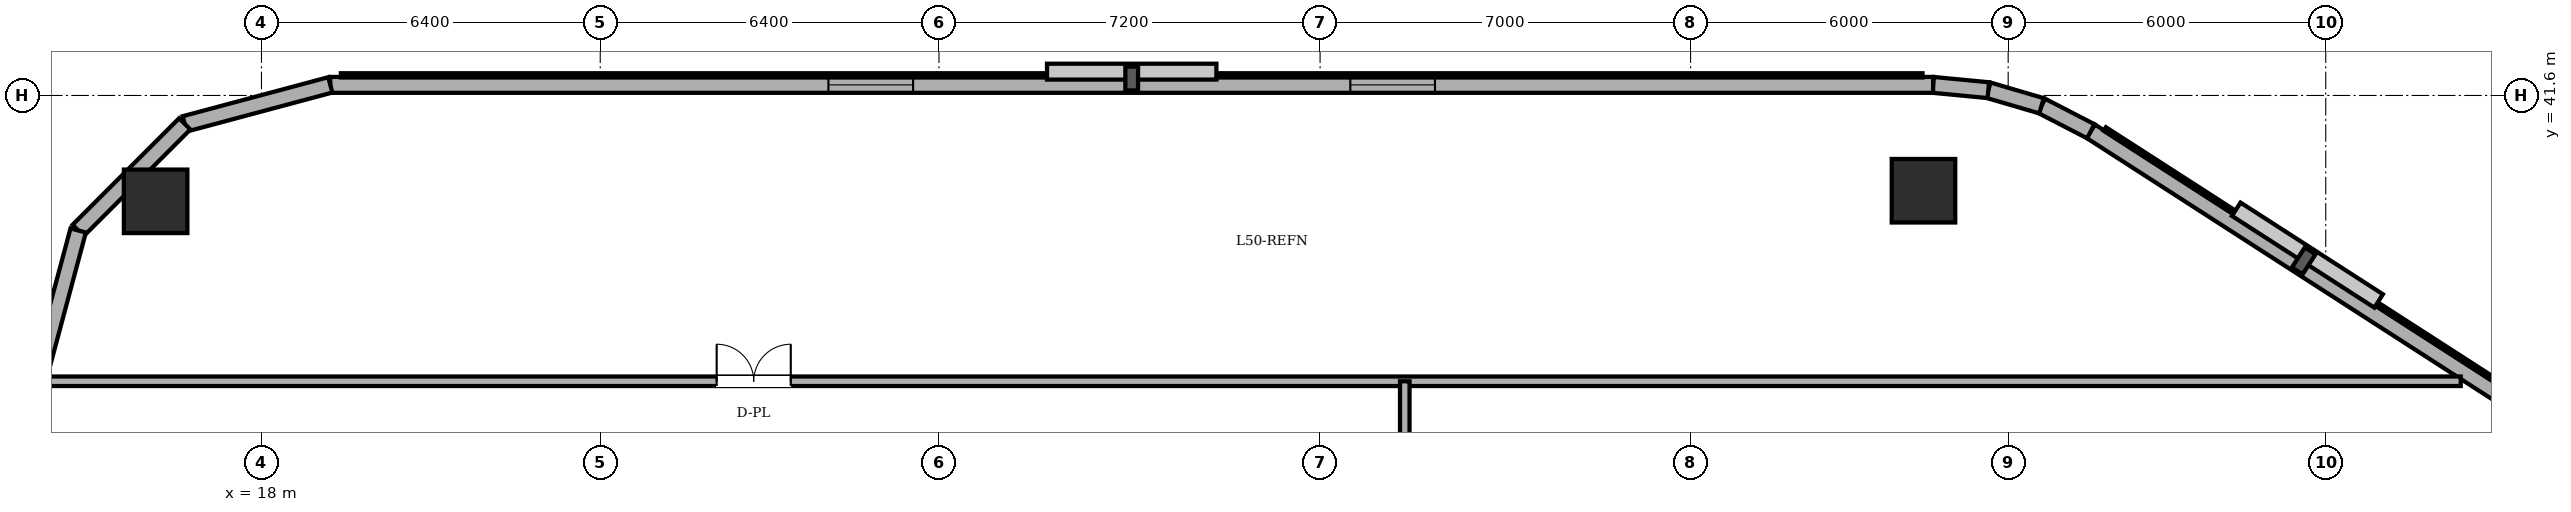
"""IFC4 building model, lengths in metres.
Left out: names, types, materials, properties, quantities, classifications, styles, units other than length and angle.
Written with IfcOpenShell. Run it as: python <this file> out.ifc"""

import sys

from ifc_helpers import new_model, si_unit, direction, frame, frame_2d, origin, origin_2d, place, context, subcontext, project, spatial, rectangle, circle, extrude, element, fill, save


model = new_model("IFC4")
c1 = context("Model", 3, precision=1e-05, world=origin(), true_north=direction((0.0, 1.0)))
c2 = subcontext(c1, "Body", "Model", "MODEL_VIEW")
j1 = project(units=[si_unit("LENGTHUNIT", "METRE"), si_unit("PLANEANGLEUNIT", "RADIAN")], contexts=[c1])
p1 = place(None, origin())
s1 = spatial("IfcSite", under=j1, at=p1, CompositionType="ELEMENT")
p2 = place(p1, origin())
s2 = spatial("IfcBuilding", under=s1, at=p2, CompositionType="ELEMENT")
p3 = place(p2, frame((0.0, 0.0, 190.6)))
s3 = spatial("IfcBuildingStorey", under=s2, at=p3, CompositionType="ELEMENT", Elevation=190.6)
for number, where, z_axis, x_axis in (
    (1, (49.4, 39.8, 0.0), (0.0, 0.0, 1.0), (1.0, 0.0, 0.0)),
    (2, (16.0, 39.6, 0.0), (0.0, 0.0, 1.0), (1.0, 0.0, 0.0)),
):
    element("IfcColumn", number, at=place(p3, frame(where, z_axis=z_axis, x_axis=x_axis)), inside=s3, PredefinedType="COLUMN", context=c2, shape_type="SweptSolid", body=[
        extrude(circle(Radius=0.6, at=origin_2d()), origin(), (0.0, 0.0, 1.0), 2.96),
    ])
p4 = place(p3, frame((60.478, 35.824, 0.0), z_axis=(0.0, 0.0, 1.0), x_axis=(-0.840696388796, 0.541506769917, 0.0)))
e3 = element("IfcWall", 3, at=p4, inside=s3, PredefinedType="SOLIDWALL", context=c2, shape_type="SweptSolid", body=[
    extrude(rectangle(XDim=9.418, YDim=0.3, at=frame_2d((4.709, 0.0))), origin(), (0.0, 0.0, 1.0), 5.36),
])
p5 = place(p3, frame((52.56, 40.924, 0.0), z_axis=(0.0, 0.0, 1.0), x_axis=(-0.888283247196, 0.459296062198, 0.0)))
e4 = element("IfcWall", 4, at=p5, inside=s3, PredefinedType="SOLIDWALL", context=c2, shape_type="SweptSolid", body=[
    extrude(rectangle(XDim=1.047, YDim=0.3, at=frame_2d((0.523, 0.0))), origin(), (0.0, 0.0, 1.0), 5.36),
])
p6 = place(p3, frame((51.63, 41.405, 0.0), z_axis=(0.0, 0.0, 1.0), x_axis=(-0.959528674476, 0.281610942363, 0.0)))
e5 = element("IfcWall", 5, at=p6, inside=s3, PredefinedType="SOLIDWALL", context=c2, shape_type="SweptSolid", body=[
    extrude(rectangle(XDim=1.047, YDim=0.3, at=frame_2d((0.524, 0.0))), origin(), (0.0, 0.0, 1.0), 5.36),
])
p7 = place(p3, frame((50.625, 41.7, 0.0), z_axis=(0.0, 0.0, 1.0), x_axis=(-0.995426089968, 0.095534807324, 0.0)))
e6 = element("IfcWall", 6, at=p7, inside=s3, PredefinedType="SOLIDWALL", context=c2, shape_type="SweptSolid", body=[
    extrude(rectangle(XDim=1.048, YDim=0.3, at=frame_2d((0.524, 0.0))), origin(), (0.0, 0.0, 1.0), 5.36),
])
p8 = place(p3, frame((49.582, 41.8, 0.0), z_axis=(0.0, 0.0, 1.0), x_axis=(-1.0, 0.0, 0.0)))
e7 = element("IfcWall", 7, at=p8, inside=s3, PredefinedType="SOLIDWALL", context=c2, shape_type="SweptSolid", body=[
    extrude(rectangle(XDim=30.282, YDim=0.3, at=frame_2d((15.141, 0.0))), origin(), (0.0, 0.0, 1.0), 5.36),
])
p9 = place(p8, frame((9.411, 0.0, 0.85)))
e8 = element("IfcOpeningElement", 8, at=p9, cuts=e7, PredefinedType="OPENING", context=c2, shape_type="SweptSolid", body=[
    extrude(rectangle(XDim=1.6, YDim=1.2, at=frame_2d((0.8, 0.6))), frame((0.0, 0.16, 0.0), z_axis=(0.0, -1.0, 0.0), x_axis=(1.0, 0.0, 0.0)), (0.0, 0.0, 1.0), 0.32),
])
p10 = place(p8, frame((19.271, 0.0, 0.85)))
e9 = element("IfcOpeningElement", 9, at=p10, cuts=e7, PredefinedType="OPENING", context=c2, shape_type="SweptSolid", body=[
    extrude(rectangle(XDim=1.6, YDim=1.2, at=frame_2d((0.8, 0.6))), frame((0.0, 0.16, 0.0), z_axis=(0.0, -1.0, 0.0), x_axis=(1.0, 0.0, 0.0)), (0.0, 0.0, 1.0), 0.32),
])
p11 = place(p3, frame((19.3, 41.8, 0.0), z_axis=(0.0, 0.0, 1.0), x_axis=(-0.965908238586, -0.258884674387, 0.0)))
e10 = element("IfcWall", 10, at=p11, inside=s3, PredefinedType="SOLIDWALL", context=c2, shape_type="SweptSolid", body=[
    extrude(rectangle(XDim=2.847, YDim=0.3, at=frame_2d((1.424, 0.0))), origin(), (0.0, 0.0, 1.0), 5.36),
])
p12 = place(p3, frame((16.55, 41.063, 0.0), z_axis=(0.0, 0.0, 1.0), x_axis=(-0.707106781187, -0.707106781187, 0.0)))
e11 = element("IfcWall", 11, at=p12, inside=s3, PredefinedType="SOLIDWALL", context=c2, shape_type="SweptSolid", body=[
    extrude(rectangle(XDim=2.847, YDim=0.3, at=frame_2d((1.423, 0.0))), origin(), (0.0, 0.0, 1.0), 5.36),
])
p13 = place(p3, frame((14.537, 39.05, 0.0), z_axis=(0.0, 0.0, 1.0), x_axis=(-0.258884674387, -0.965908238586, 0.0)))
e12 = element("IfcWall", 12, at=p13, inside=s3, PredefinedType="SOLIDWALL", context=c2, shape_type="SweptSolid", body=[
    extrude(rectangle(XDim=2.847, YDim=0.3, at=frame_2d((1.424, 0.0))), origin(), (0.0, 0.0, 1.0), 5.36),
])
p14 = place(p3, frame((13.8, 36.2, 0.0), z_axis=(0.0, 0.0, 1.0), x_axis=(1.0, 0.0, 0.0)))
e13 = element("IfcWall", 13, at=p14, inside=s3, PredefinedType="PARTITIONING", context=c2, shape_type="SweptSolid", body=[
    extrude(rectangle(XDim=45.75, YDim=0.18, at=frame_2d((22.875, 0.0))), origin(), (0.0, 0.0, 1.0), 5.36),
])
p15 = place(p14, frame((12.8, 0.0, 0.0)))
e14 = element("IfcOpeningElement", 14, at=p15, cuts=e13, PredefinedType="OPENING", context=c2, shape_type="SweptSolid", body=[
    extrude(rectangle(XDim=1.4, YDim=2.25, at=frame_2d((0.7, 1.125))), frame((0.0, 0.1, 0.0), z_axis=(0.0, -1.0, 0.0), x_axis=(1.0, 0.0, 0.0)), (0.0, 0.0, 1.0), 0.2),
])
p16 = place(p3, frame((39.6, 11.8, 0.0), z_axis=(0.0, 0.0, 1.0), x_axis=(0.0, 1.0, 0.0)))
e15 = element("IfcWall", 15, at=p16, inside=s3, PredefinedType="PARTITIONING", context=c2, shape_type="SweptSolid", body=[
    extrude(rectangle(XDim=24.4, YDim=0.18, at=frame_2d((12.2, 0.0))), origin(), (0.0, 0.0, 1.0), 5.36),
])
p17 = place(p16, frame((18.07, 0.0, 0.0)))
e16 = element("IfcOpeningElement", 16, at=p17, cuts=e15, PredefinedType="OPENING", context=c2, shape_type="SweptSolid", body=[
    extrude(rectangle(XDim=1.4, YDim=2.25, at=frame_2d((0.7, 1.125))), frame((0.0, 0.1, 0.0), z_axis=(0.0, -1.0, 0.0), x_axis=(1.0, 0.0, 0.0)), (0.0, 0.0, 1.0), 0.2),
])
p18 = place(p16, frame((5.6, 0.0, 0.0)))
e17 = element("IfcOpeningElement", 17, at=p18, cuts=e15, PredefinedType="OPENING", context=c2, shape_type="SweptSolid", body=[
    extrude(rectangle(XDim=1.4, YDim=2.25, at=frame_2d((0.7, 1.125))), frame((0.0, 0.1, 0.0), z_axis=(0.0, -1.0, 0.0), x_axis=(1.0, 0.0, 0.0)), (0.0, 0.0, 1.0), 0.2),
])
p19 = place(p16, frame((9.7, 0.0, 0.0)))
e18 = element("IfcOpeningElement", 18, at=p19, cuts=e15, PredefinedType="OPENING", context=c2, shape_type="SweptSolid", body=[
    extrude(rectangle(XDim=1.4, YDim=2.25, at=frame_2d((0.7, 1.125))), frame((0.0, 0.1, 0.0), z_axis=(0.0, -1.0, 0.0), x_axis=(1.0, 0.0, 0.0)), (0.0, 0.0, 1.0), 0.2),
])
p20 = place(p9, origin())
e19 = element("IfcWindow", 19, at=p20, inside=s3, PartitioningType="DOUBLE_PANEL_VERTICAL", PredefinedType="WINDOW", context=c2, shape_type="SweptSolid", body=[
    extrude(rectangle(XDim=1.6, YDim=1.2, at=frame_2d((0.8, 0.6))), frame((0.0, 0.03, 0.0), z_axis=(0.0, -1.0, 0.0), x_axis=(1.0, 0.0, 0.0)), (0.0, 0.0, 1.0), 0.06),
])
fill(e8, e19)
p21 = place(p10, origin())
e20 = element("IfcWindow", 20, at=p21, inside=s3, PartitioningType="DOUBLE_PANEL_VERTICAL", PredefinedType="WINDOW", context=c2, shape_type="SweptSolid", body=[
    extrude(rectangle(XDim=1.6, YDim=1.2, at=frame_2d((0.8, 0.6))), frame((0.0, 0.03, 0.0), z_axis=(0.0, -1.0, 0.0), x_axis=(1.0, 0.0, 0.0)), (0.0, 0.0, 1.0), 0.06),
])
fill(e9, e20)
p22 = place(p15, origin())
e21 = element("IfcDoor", 21, at=p22, inside=s3, OperationType="DOUBLE_DOOR_SINGLE_SWING", PredefinedType="DOOR", context=c2, shape_type="SweptSolid", body=[
    extrude(rectangle(XDim=1.4, YDim=2.25, at=frame_2d((0.7, 1.125))), frame((0.0, 0.025, 0.0), z_axis=(0.0, -1.0, 0.0), x_axis=(1.0, 0.0, 0.0)), (0.0, 0.0, 1.0), 0.05),
])
fill(e14, e21)
save(model, sys.argv[1])
